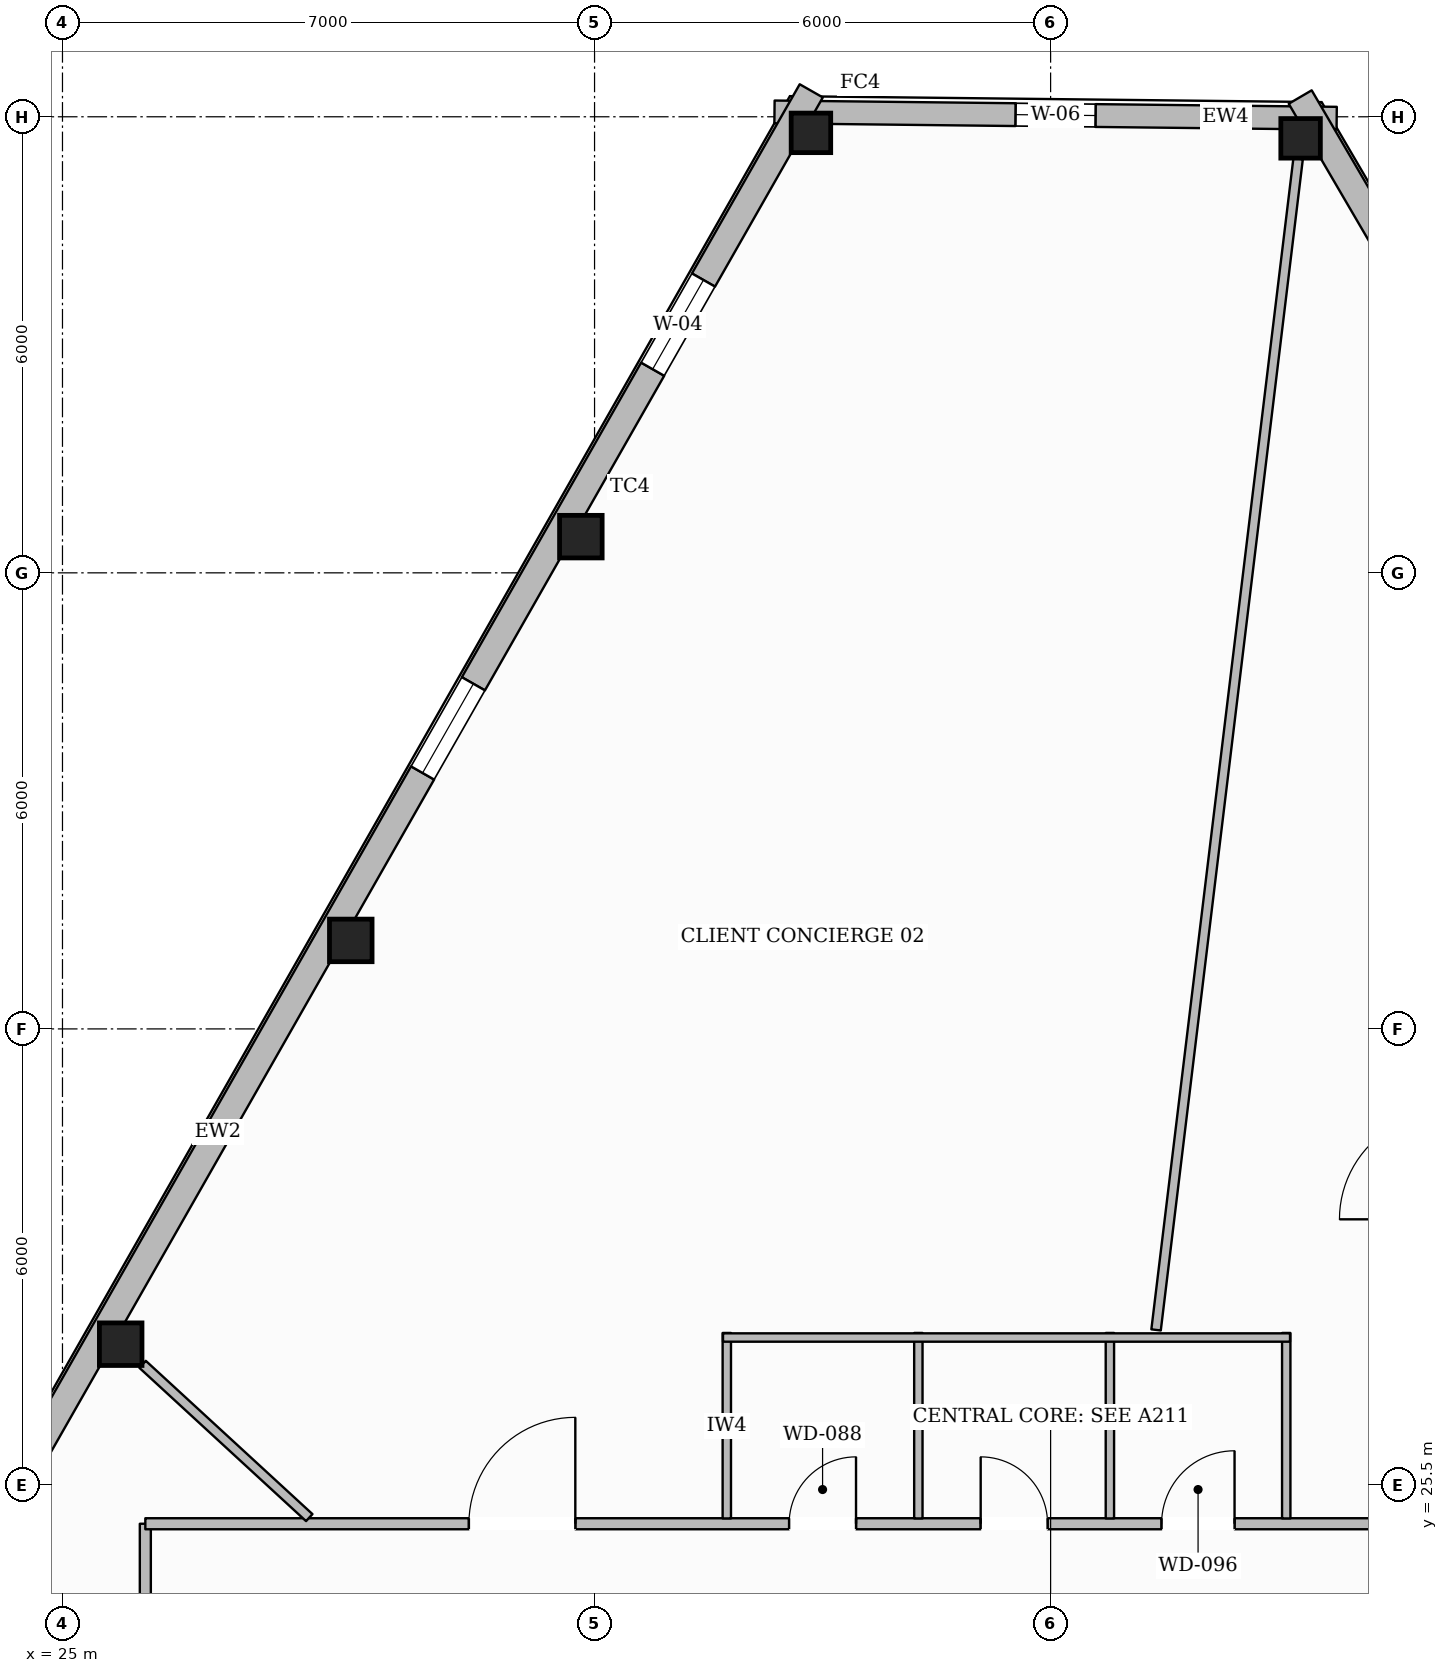
"""IFC4 building model, lengths in metres.
Left out: names, types, materials, properties, quantities, classifications, styles, units other than length and angle.
Written with IfcOpenShell. Run it as: python <this file> out.ifc"""

import sys

from ifc_helpers import new_model, si_unit, direction, frame, frame_2d, origin, origin_2d, place, context, subcontext, project, spatial, rectangle, hollow_rectangle, extrude, element, fill, save


model = new_model("IFC4")
c1 = context("Model", 3, precision=1e-05, world=origin(), true_north=direction((0.0, 1.0)))
c2 = subcontext(c1, "Body", "Model", "MODEL_VIEW")
j1 = project(units=[si_unit("LENGTHUNIT", "METRE"), si_unit("PLANEANGLEUNIT", "RADIAN")], contexts=[c1])
p1 = place(None, origin())
s1 = spatial("IfcSite", under=j1, at=p1, CompositionType="ELEMENT")
p2 = place(p1, origin())
s2 = spatial("IfcBuilding", under=s1, at=p2, CompositionType="ELEMENT")
p3 = place(p2, frame((0.0, 0.0, 251.05)))
s3 = spatial("IfcBuildingStorey", under=s2, at=p3, CompositionType="ELEMENT", Elevation=251.05)
p4 = place(p3, frame((34.847, 43.288, 0.0), z_axis=(0.0, 0.0, 1.0), x_axis=(1.0, 0.0, 0.0)))
e1 = element("IfcColumn", 1, at=p4, inside=s3, PredefinedType="COLUMN", context=c2, shape_type="SweptSolid", body=[
    extrude(hollow_rectangle(XDim=0.52, YDim=0.52, WallThickness=0.024, at=origin_2d()), origin(), (0.0, 0.0, 1.0), 3.61),
])
for number, where, z_axis, x_axis in (
    (2, (31.82, 37.976, 0.0), (0.0, 0.0, 1.0), (1.0, 0.0, 0.0)),
    (3, (28.793, 32.664, 0.0), (0.0, 0.0, 1.0), (1.0, 0.0, 0.0)),
    (4, (25.766, 27.352, 0.0), (0.0, 0.0, 1.0), (1.0, 0.0, 0.0)),
):
    element("IfcColumn", number, at=place(p3, frame(where, z_axis=z_axis, x_axis=x_axis)), inside=s3, PredefinedType="COLUMN", context=c2, shape_type="SweptSolid", body=[
        extrude(hollow_rectangle(XDim=0.56, YDim=0.56, WallThickness=0.025, at=origin_2d()), origin(), (0.0, 0.0, 1.0), 3.61),
    ])
p5 = place(p3, frame((41.289, 43.216, 0.0), z_axis=(0.0, 0.0, 1.0), x_axis=(1.0, 0.0, 0.0)))
e5 = element("IfcColumn", 5, at=p5, inside=s3, PredefinedType="COLUMN", context=c2, shape_type="SweptSolid", body=[
    extrude(hollow_rectangle(XDim=0.52, YDim=0.52, WallThickness=0.024, at=origin_2d()), origin(), (0.0, 0.0, 1.0), 3.61),
])
p6 = place(p3, frame((34.367, 43.564, 0.0), z_axis=(0.0, 0.0, 1.0), x_axis=(0.999937028375, -0.011222267359, 0.0)))
e6 = element("IfcWall", 6, at=p6, inside=s3, PredefinedType="STANDARD", context=c2, shape_type="SweptSolid", body=[
    extrude(rectangle(XDim=7.397, YDim=0.3, at=frame_2d((3.698, 0.0))), origin(), (0.0, 0.0, 1.0), 3.196),
])
p7 = place(p6, frame((3.173, 0.0, 0.65)))
e7 = element("IfcOpeningElement", 7, at=p7, cuts=e6, PredefinedType="OPENING", context=c2, shape_type="SweptSolid", body=[
    extrude(rectangle(XDim=1.05, YDim=1.7, at=frame_2d((0.525, 0.85))), frame((0.0, 0.16, 0.0), z_axis=(0.0, -1.0, 0.0), x_axis=(1.0, 0.0, 0.0)), (0.0, 0.0, 1.0), 0.32),
])
p8 = place(p3, frame((16.214, 11.135, 0.0), z_axis=(0.0, 0.0, 1.0), x_axis=(0.49510347201, 0.868834018673, 0.0)))
e8 = element("IfcWall", 8, at=p8, inside=s3, PredefinedType="STANDARD", context=c2, shape_type="SweptSolid", body=[
    extrude(rectangle(XDim=37.643, YDim=0.35, at=frame_2d((18.822, 0.0))), origin(), (0.0, 0.0, 1.0), 3.196),
])
p9 = place(p8, frame((33.429, 0.0, 0.65)))
e9 = element("IfcOpeningElement", 9, at=p9, cuts=e8, PredefinedType="OPENING", context=c2, shape_type="SweptSolid", body=[
    extrude(rectangle(XDim=1.35, YDim=1.75, at=frame_2d((0.675, 0.875))), frame((0.0, 0.185, 0.0), z_axis=(0.0, -1.0, 0.0), x_axis=(1.0, 0.0, 0.0)), (0.0, 0.0, 1.0), 0.37),
])
p10 = place(p8, frame((27.315, 0.0, 0.65)))
e10 = element("IfcOpeningElement", 10, at=p10, cuts=e8, PredefinedType="OPENING", context=c2, shape_type="SweptSolid", body=[
    extrude(rectangle(XDim=1.35, YDim=1.75, at=frame_2d((0.675, 0.875))), frame((0.0, 0.185, 0.0), z_axis=(0.0, -1.0, 0.0), x_axis=(1.0, 0.0, 0.0)), (0.0, 0.0, 1.0), 0.37),
])
p11 = place(p8, frame((15.087, 0.0, 0.65)))
e11 = element("IfcOpeningElement", 11, at=p11, cuts=e8, PredefinedType="OPENING", context=c2, shape_type="SweptSolid", body=[
    extrude(rectangle(XDim=1.35, YDim=1.75, at=frame_2d((0.675, 0.875))), frame((0.0, 0.185, 0.0), z_axis=(0.0, -1.0, 0.0), x_axis=(1.0, 0.0, 0.0)), (0.0, 0.0, 1.0), 0.37),
])
p12 = place(p8, frame((8.973, 0.0, 0.65)))
e12 = element("IfcOpeningElement", 12, at=p12, cuts=e8, PredefinedType="OPENING", context=c2, shape_type="SweptSolid", body=[
    extrude(rectangle(XDim=1.35, YDim=1.75, at=frame_2d((0.675, 0.875))), frame((0.0, 0.185, 0.0), z_axis=(0.0, -1.0, 0.0), x_axis=(1.0, 0.0, 0.0)), (0.0, 0.0, 1.0), 0.37),
])
p13 = place(p8, frame((2.859, 0.0, 0.65)))
e13 = element("IfcOpeningElement", 13, at=p13, cuts=e8, PredefinedType="OPENING", context=c2, shape_type="SweptSolid", body=[
    extrude(rectangle(XDim=1.35, YDim=1.75, at=frame_2d((0.675, 0.875))), frame((0.0, 0.185, 0.0), z_axis=(0.0, -1.0, 0.0), x_axis=(1.0, 0.0, 0.0)), (0.0, 0.0, 1.0), 0.37),
])
p14 = place(p3, frame((41.284, 43.76, 0.0), z_axis=(0.0, 0.0, 1.0), x_axis=(0.50479404613, -0.863239810824, 0.0)))
e14 = element("IfcWall", 14, at=p14, inside=s3, PredefinedType="STANDARD", context=c2, shape_type="SweptSolid", body=[
    extrude(rectangle(XDim=38.372, YDim=0.35, at=frame_2d((19.186, 0.0))), origin(), (0.0, 0.0, 1.0), 3.196),
])
p15 = place(p14, frame((34.102, 0.0, 0.65)))
e15 = element("IfcOpeningElement", 15, at=p15, cuts=e14, PredefinedType="OPENING", context=c2, shape_type="SweptSolid", body=[
    extrude(rectangle(XDim=1.35, YDim=1.75, at=frame_2d((0.675, 0.875))), frame((0.0, 0.185, 0.0), z_axis=(0.0, -1.0, 0.0), x_axis=(1.0, 0.0, 0.0)), (0.0, 0.0, 1.0), 0.37),
])
p16 = place(p14, frame((27.864, 0.0, 0.65)))
e16 = element("IfcOpeningElement", 16, at=p16, cuts=e14, PredefinedType="OPENING", context=c2, shape_type="SweptSolid", body=[
    extrude(rectangle(XDim=1.35, YDim=1.75, at=frame_2d((0.675, 0.875))), frame((0.0, 0.185, 0.0), z_axis=(0.0, -1.0, 0.0), x_axis=(1.0, 0.0, 0.0)), (0.0, 0.0, 1.0), 0.37),
])
p17 = place(p14, frame((15.39, 0.0, 0.65)))
e17 = element("IfcOpeningElement", 17, at=p17, cuts=e14, PredefinedType="OPENING", context=c2, shape_type="SweptSolid", body=[
    extrude(rectangle(XDim=1.35, YDim=1.75, at=frame_2d((0.675, 0.875))), frame((0.0, 0.185, 0.0), z_axis=(0.0, -1.0, 0.0), x_axis=(1.0, 0.0, 0.0)), (0.0, 0.0, 1.0), 0.37),
])
p18 = place(p14, frame((9.153, 0.0, 0.65)))
e18 = element("IfcOpeningElement", 18, at=p18, cuts=e14, PredefinedType="OPENING", context=c2, shape_type="SweptSolid", body=[
    extrude(rectangle(XDim=1.35, YDim=1.75, at=frame_2d((0.675, 0.875))), frame((0.0, 0.185, 0.0), z_axis=(0.0, -1.0, 0.0), x_axis=(1.0, 0.0, 0.0)), (0.0, 0.0, 1.0), 0.37),
])
p19 = place(p14, frame((2.915, 0.0, 0.65)))
e19 = element("IfcOpeningElement", 19, at=p19, cuts=e14, PredefinedType="OPENING", context=c2, shape_type="SweptSolid", body=[
    extrude(rectangle(XDim=1.35, YDim=1.75, at=frame_2d((0.675, 0.875))), frame((0.0, 0.185, 0.0), z_axis=(0.0, -1.0, 0.0), x_axis=(1.0, 0.0, 0.0)), (0.0, 0.0, 1.0), 0.37),
])
p20 = place(p3, frame((26.09, 7.21, 0.0), z_axis=(0.0, 0.0, 1.0), x_axis=(0.0, 1.0, 0.0)))
e20 = element("IfcWall", 20, at=p20, inside=s3, PredefinedType="PARTITIONING", context=c2, shape_type="SweptSolid", body=[
    extrude(rectangle(XDim=17.78, YDim=0.145, at=frame_2d((8.89, 0.0))), origin(), (0.0, 0.0, 1.0), 3.349),
])
p21 = place(p20, frame((11.443, 0.0, 0.0)))
e21 = element("IfcOpeningElement", 21, at=p21, cuts=e20, PredefinedType="OPENING", context=c2, shape_type="SweptSolid", body=[
    extrude(rectangle(XDim=0.98, YDim=2.15, at=frame_2d((0.49, 1.075))), frame((0.0, 0.083, 0.0), z_axis=(0.0, -1.0, 0.0), x_axis=(1.0, 0.0, 0.0)), (0.0, 0.0, 1.0), 0.165),
])
p22 = place(p3, frame((26.09, 24.99, 0.0), z_axis=(0.0, 0.0, 1.0), x_axis=(1.0, 0.0, 0.0)))
e22 = element("IfcWall", 22, at=p22, inside=s3, PredefinedType="PARTITIONING", context=c2, shape_type="SweptSolid", body=[
    extrude(rectangle(XDim=17.11, YDim=0.145, at=frame_2d((8.555, 0.0))), origin(), (0.0, 0.0, 1.0), 3.61),
])
p23 = place(p22, frame((8.47, 0.0, 0.0)))
e23 = element("IfcOpeningElement", 23, at=p23, cuts=e22, PredefinedType="OPENING", context=c2, shape_type="SweptSolid", body=[
    extrude(rectangle(XDim=0.88, YDim=2.1, at=frame_2d((0.44, 1.05))), frame((0.0, 0.083, 0.0), z_axis=(0.0, -1.0, 0.0), x_axis=(1.0, 0.0, 0.0)), (0.0, 0.0, 1.0), 0.165),
])
p24 = place(p22, frame((10.99, 0.0, 0.0)))
e24 = element("IfcOpeningElement", 24, at=p24, cuts=e22, PredefinedType="OPENING", context=c2, shape_type="SweptSolid", body=[
    extrude(rectangle(XDim=0.88, YDim=2.1, at=frame_2d((0.44, 1.05))), frame((0.0, 0.083, 0.0), z_axis=(0.0, -1.0, 0.0), x_axis=(1.0, 0.0, 0.0)), (0.0, 0.0, 1.0), 0.165),
])
p25 = place(p22, frame((13.37, 0.0, 0.0)))
e25 = element("IfcOpeningElement", 25, at=p25, cuts=e22, PredefinedType="OPENING", context=c2, shape_type="SweptSolid", body=[
    extrude(rectangle(XDim=0.96, YDim=2.1, at=frame_2d((0.48, 1.05))), frame((0.0, 0.083, 0.0), z_axis=(0.0, -1.0, 0.0), x_axis=(1.0, 0.0, 0.0)), (0.0, 0.0, 1.0), 0.165),
])
p26 = place(p22, frame((4.257, 0.0, 0.0)))
e26 = element("IfcOpeningElement", 26, at=p26, cuts=e22, PredefinedType="OPENING", context=c2, shape_type="SweptSolid", body=[
    extrude(rectangle(XDim=1.4, YDim=2.2, at=frame_2d((0.7, 1.1))), frame((0.0, 0.083, 0.0), z_axis=(0.0, -1.0, 0.0), x_axis=(1.0, 0.0, 0.0)), (0.0, 0.0, 1.0), 0.165),
])
for number, where, z_axis, x_axis in (
    (27, (33.74, 25.06, 0.0), (0.0, 0.0, 1.0), (0.0, 1.0, 0.0)),
    (28, (36.26, 25.06, 0.0), (0.0, 0.0, 1.0), (0.0, 1.0, 0.0)),
    (29, (38.78, 25.06, 0.0), (0.0, 0.0, 1.0), (0.0, 1.0, 0.0)),
    (30, (41.1, 25.06, 0.0), (0.0, 0.0, 1.0), (0.0, 1.0, 0.0)),
):
    element("IfcWall", number, at=place(p3, frame(where, z_axis=z_axis, x_axis=x_axis)), inside=s3, PredefinedType="PLUMBINGWALL", context=c2, shape_type="SweptSolid", body=[
        extrude(rectangle(XDim=2.44, YDim=0.11, at=frame_2d((1.22, 0.0))), origin(), (0.0, 0.0, 1.0), 3.61),
    ])
p27 = place(p3, frame((33.69, 27.44, 0.0), z_axis=(0.0, 0.0, 1.0), x_axis=(1.0, 0.0, 0.0)))
e31 = element("IfcWall", 31, at=p27, inside=s3, PredefinedType="PLUMBINGWALL", context=c2, shape_type="SweptSolid", body=[
    extrude(rectangle(XDim=7.46, YDim=0.11, at=frame_2d((3.73, 0.0))), origin(), (0.0, 0.0, 1.0), 3.61),
])
p28 = place(p3, frame((39.387, 27.54, 0.0), z_axis=(0.0, 0.0, 1.0), x_axis=(0.12041169592, 0.99272404196, 0.0)))
e32 = element("IfcWall", 32, at=p28, inside=s3, PredefinedType="PARTITIONING", context=c2, shape_type="SweptSolid", body=[
    extrude(rectangle(XDim=15.521, YDim=0.125, at=frame_2d((7.76, 0.0))), origin(), (0.0, 0.0, 1.0), 3.246),
])
p29 = place(p3, frame((28.247, 25.071, 0.0), z_axis=(0.0, 0.0, 1.0), x_axis=(-0.736030630255, 0.67694823386, 0.0)))
e33 = element("IfcWall", 33, at=p29, inside=s3, PredefinedType="PARTITIONING", context=c2, shape_type="SweptSolid", body=[
    extrude(rectangle(XDim=2.979, YDim=0.125, at=frame_2d((1.49, 0.0))), origin(), (0.0, 0.0, 1.0), 3.61),
])
p30 = place(p9, origin())
e34 = element("IfcWindow", 34, at=p30, inside=s3, PartitioningType="SINGLE_PANEL", PredefinedType="WINDOW", context=c2, shape_type="SweptSolid", body=[
    extrude(rectangle(XDim=1.35, YDim=1.75, at=frame_2d((0.675, 0.875))), frame((0.0, 0.03, 0.0), z_axis=(0.0, -1.0, 0.0), x_axis=(1.0, 0.0, 0.0)), (0.0, 0.0, 1.0), 0.06),
])
fill(e9, e34)
p31 = place(p10, origin())
e35 = element("IfcWindow", 35, at=p31, inside=s3, PartitioningType="SINGLE_PANEL", PredefinedType="WINDOW", context=c2, shape_type="SweptSolid", body=[
    extrude(rectangle(XDim=1.35, YDim=1.75, at=frame_2d((0.675, 0.875))), frame((0.0, 0.03, 0.0), z_axis=(0.0, -1.0, 0.0), x_axis=(1.0, 0.0, 0.0)), (0.0, 0.0, 1.0), 0.06),
])
fill(e10, e35)
p32 = place(p7, origin())
e36 = element("IfcWindow", 36, at=p32, inside=s3, PartitioningType="SINGLE_PANEL", PredefinedType="WINDOW", context=c2, shape_type="SweptSolid", body=[
    extrude(rectangle(XDim=1.05, YDim=1.7, at=frame_2d((0.525, 0.85))), frame((0.0, 0.03, 0.0), z_axis=(0.0, -1.0, 0.0), x_axis=(1.0, 0.0, 0.0)), (0.0, 0.0, 1.0), 0.06),
])
fill(e7, e36)
p33 = place(p23, origin())
e37 = element("IfcDoor", 37, at=p33, inside=s3, OperationType="SINGLE_SWING_RIGHT", PredefinedType="DOOR", context=c2, shape_type="SweptSolid", body=[
    extrude(rectangle(XDim=0.88, YDim=2.1, at=frame_2d((0.44, 1.05))), frame((0.0, 0.025, 0.0), z_axis=(0.0, -1.0, 0.0), x_axis=(1.0, 0.0, 0.0)), (0.0, 0.0, 1.0), 0.05),
])
fill(e23, e37)
p34 = place(p24, origin())
e38 = element("IfcDoor", 38, at=p34, inside=s3, OperationType="SINGLE_SWING_LEFT", PredefinedType="DOOR", context=c2, shape_type="SweptSolid", body=[
    extrude(rectangle(XDim=0.88, YDim=2.1, at=frame_2d((0.44, 1.05))), frame((0.0, 0.025, 0.0), z_axis=(0.0, -1.0, 0.0), x_axis=(1.0, 0.0, 0.0)), (0.0, 0.0, 1.0), 0.05),
])
fill(e24, e38)
p35 = place(p25, origin())
e39 = element("IfcDoor", 39, at=p35, inside=s3, OperationType="SINGLE_SWING_RIGHT", PredefinedType="DOOR", context=c2, shape_type="SweptSolid", body=[
    extrude(rectangle(XDim=0.96, YDim=2.1, at=frame_2d((0.48, 1.05))), frame((0.0, 0.025, 0.0), z_axis=(0.0, -1.0, 0.0), x_axis=(1.0, 0.0, 0.0)), (0.0, 0.0, 1.0), 0.05),
])
fill(e25, e39)
p36 = place(p26, origin())
e40 = element("IfcDoor", 40, at=p36, inside=s3, OperationType="SINGLE_SWING_RIGHT", PredefinedType="DOOR", context=c2, shape_type="SweptSolid", body=[
    extrude(rectangle(XDim=1.4, YDim=2.2, at=frame_2d((0.7, 1.1))), frame((0.0, 0.025, 0.0), z_axis=(0.0, -1.0, 0.0), x_axis=(1.0, 0.0, 0.0)), (0.0, 0.0, 1.0), 0.05),
])
fill(e26, e40)
save(model, sys.argv[1])
